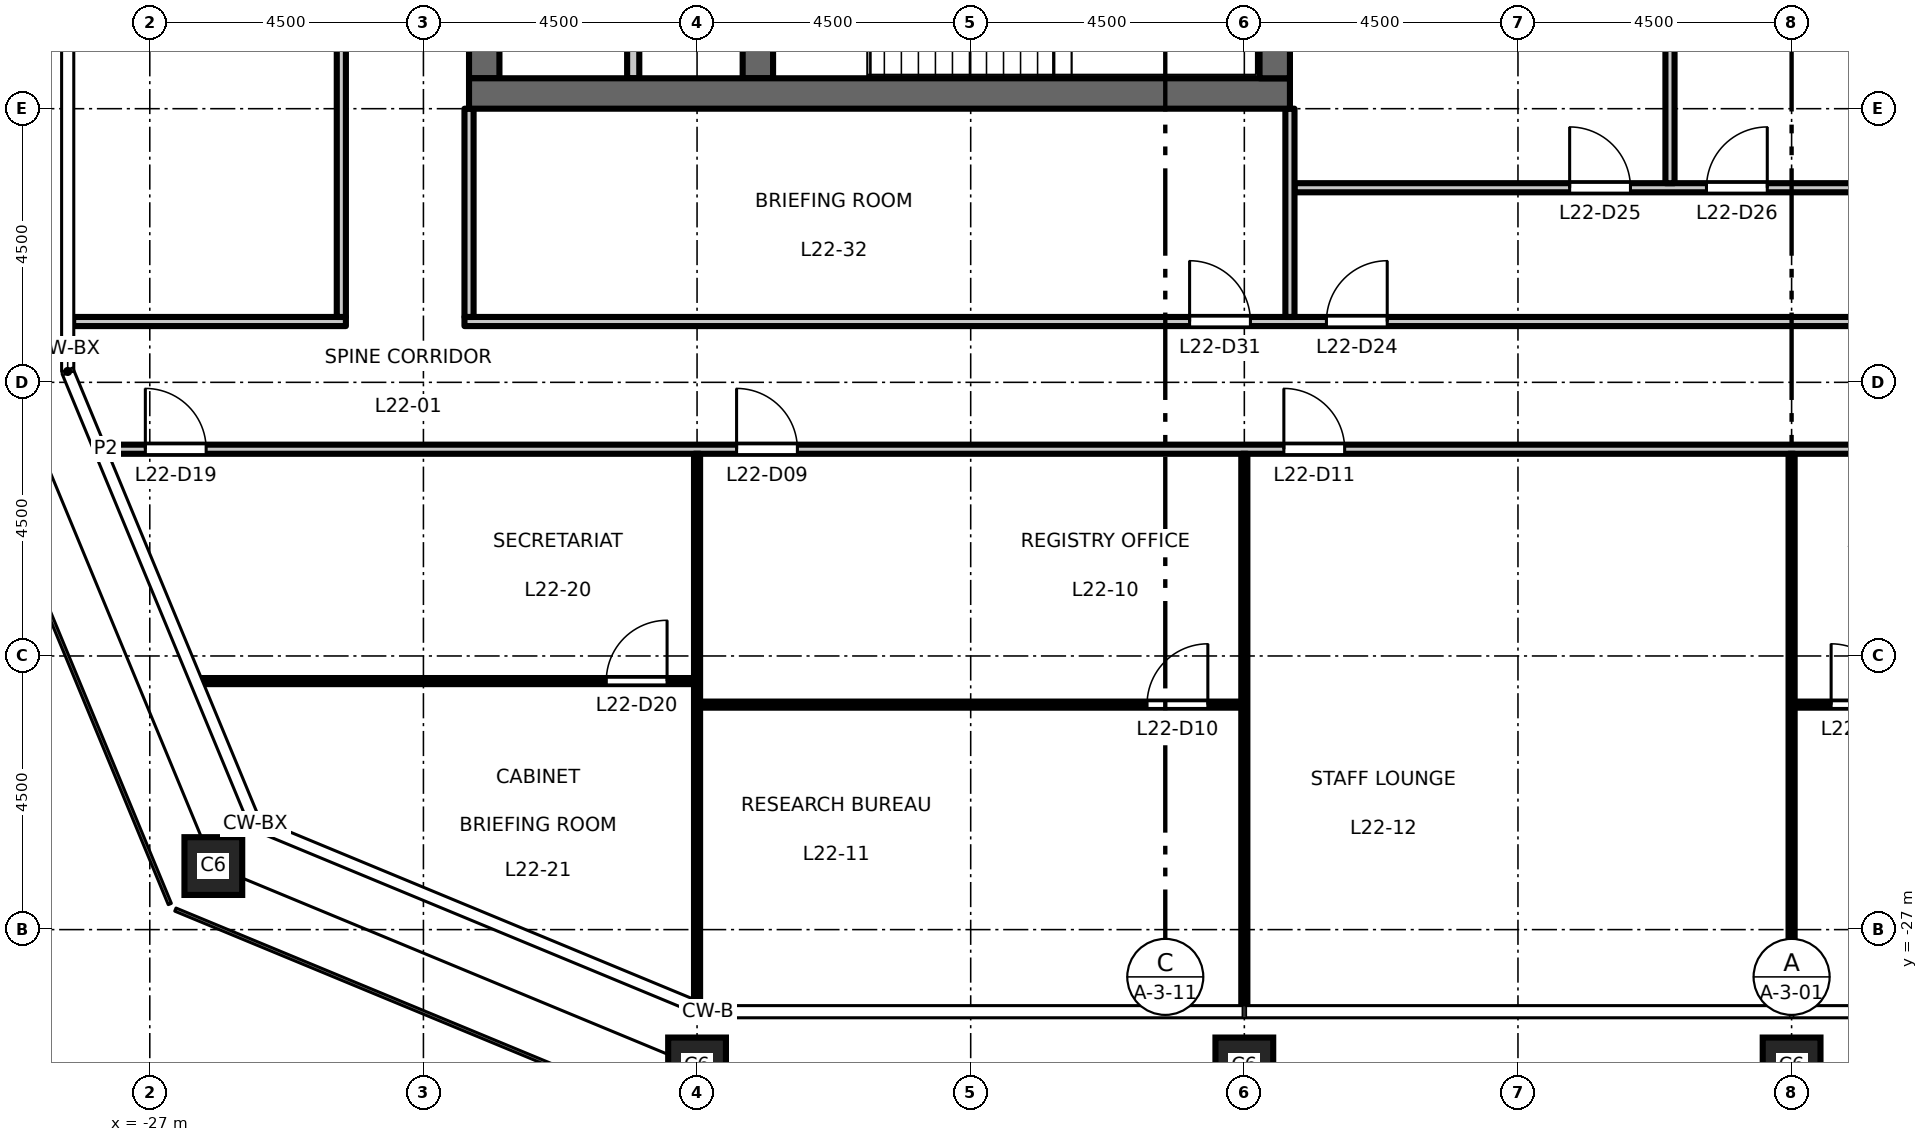
"""IFC4 building model, lengths in metres.
Left out: names, types, materials, properties, quantities, classifications, styles, units other than length and angle.
Written with IfcOpenShell. Run it as: python <this file> out.ifc"""

import sys

from ifc_helpers import new_model, si_unit, direction, frame, frame_2d, origin, origin_2d, place, context, subcontext, project, spatial, rectangle, hollow_rectangle, extrude, element, fill, save


model = new_model("IFC4")
c1 = context("Model", 3, precision=1e-05, world=origin(), true_north=direction((0.0, 1.0)))
c2 = subcontext(c1, "Body", "Model", "MODEL_VIEW")
j1 = project(units=[si_unit("LENGTHUNIT", "METRE"), si_unit("PLANEANGLEUNIT", "RADIAN")], contexts=[c1])
p1 = place(None, origin())
s1 = spatial("IfcSite", under=j1, at=p1, CompositionType="ELEMENT")
p2 = place(p1, origin())
s2 = spatial("IfcBuilding", under=s1, at=p2, CompositionType="ELEMENT")
p3 = place(p2, frame((0.0, 0.0, 104.7)))
s3 = spatial("IfcBuildingStorey", under=s2, at=p3, CompositionType="ELEMENT", Elevation=104.7)
for number, where, z_axis, x_axis in (
    (1, (-18.0, -29.25, 0.0), (0.0, 0.0, 1.0), (1.0, 0.0, 0.0)),
    (2, (-9.0, -29.25, 0.0), (0.0, 0.0, 1.0), (1.0, 0.0, 0.0)),
    (3, (0.0, -29.25, 0.0), (0.0, 0.0, 1.0), (1.0, 0.0, 0.0)),
    (4, (-25.955, -25.955, 0.0), (0.0, 0.0, 1.0), (1.0, 0.0, 0.0)),
):
    element("IfcColumn", number, at=place(p3, frame(where, z_axis=z_axis, x_axis=x_axis)), inside=s3, PredefinedType="COLUMN", context=c2, shape_type="SweptSolid", body=[
        extrude(hollow_rectangle(XDim=0.95, YDim=0.95, WallThickness=0.055, at=origin_2d()), origin(), (0.0, 0.0, 1.0), 4.5),
    ])
p4 = place(p3, frame((-21.5, -13.0, 0.0), z_axis=(0.0, 0.0, 1.0), x_axis=(0.0, 1.0, 0.0)))
e5 = element("IfcWall", 5, at=p4, inside=s3, PredefinedType="SHEAR", context=c2, shape_type="SweptSolid", body=[
    extrude(rectangle(XDim=26.0, YDim=0.5, at=frame_2d((13.0, 0.0))), origin(), (0.0, 0.0, 1.0), 4.35),
])
p5 = place(p4, frame((16.825, 0.0, 0.0)))
e6 = element("IfcOpeningElement", 6, at=p5, cuts=e5, PredefinedType="OPENING", context=c2, shape_type="SweptSolid", body=[
    extrude(rectangle(XDim=1.8, YDim=2.1, at=frame_2d((0.9, 1.05))), frame((0.0, 0.26, 0.0), z_axis=(0.0, -1.0, 0.0), x_axis=(1.0, 0.0, 0.0)), (0.0, 0.0, 1.0), 0.52),
])
p6 = place(p4, frame((7.375, 0.0, 0.0)))
e7 = element("IfcOpeningElement", 7, at=p6, cuts=e5, PredefinedType="OPENING", context=c2, shape_type="SweptSolid", body=[
    extrude(rectangle(XDim=1.8, YDim=2.1, at=frame_2d((0.9, 1.05))), frame((0.0, 0.26, 0.0), z_axis=(0.0, -1.0, 0.0), x_axis=(1.0, 0.0, 0.0)), (0.0, 0.0, 1.0), 0.52),
])
p7 = place(p4, frame((23.8, 0.0, 0.0)))
e8 = element("IfcOpeningElement", 8, at=p7, cuts=e5, PredefinedType="OPENING", context=c2, shape_type="SweptSolid", body=[
    extrude(rectangle(XDim=0.9, YDim=2.1, at=frame_2d((0.45, 1.05))), frame((0.0, 0.26, 0.0), z_axis=(0.0, -1.0, 0.0), x_axis=(1.0, 0.0, 0.0)), (0.0, 0.0, 1.0), 0.52),
])
p8 = place(p3, frame((-19.05, -13.0, 0.0), z_axis=(0.0, 0.0, 1.0), x_axis=(0.0, 1.0, 0.0)))
e9 = element("IfcWall", 9, at=p8, inside=s3, PredefinedType="PARTITIONING", context=c2, shape_type="SweptSolid", body=[
    extrude(rectangle(XDim=6.575, YDim=0.2, at=frame_2d((3.288, 0.0))), origin(), (0.0, 0.0, 1.0), 4.35),
])
p9 = place(p3, frame((-17.0, -13.0, 0.0), z_axis=(0.0, 0.0, 1.0), x_axis=(0.0, 1.0, 0.0)))
e10 = element("IfcWall", 10, at=p9, inside=s3, PredefinedType="SHEAR", context=c2, shape_type="SweptSolid", body=[
    extrude(rectangle(XDim=6.575, YDim=0.5, at=frame_2d((3.288, 0.0))), origin(), (0.0, 0.0, 1.0), 4.35),
])
p10 = place(p3, frame((-8.25, -13.25, 0.0), z_axis=(0.0, 0.0, 1.0), x_axis=(-1.0, 0.0, 0.0)))
e11 = element("IfcWall", 11, at=p10, inside=s3, PredefinedType="SHEAR", context=c2, shape_type="SweptSolid", body=[
    extrude(rectangle(XDim=13.5, YDim=0.5, at=frame_2d((6.75, 0.0))), origin(), (0.0, 0.0, 1.0), 4.35),
])
p11 = place(p3, frame((-8.5, -13.0, 0.0), z_axis=(0.0, 0.0, 1.0), x_axis=(0.0, 1.0, 0.0)))
e12 = element("IfcWall", 12, at=p11, inside=s3, PredefinedType="SHEAR", context=c2, shape_type="SweptSolid", body=[
    extrude(rectangle(XDim=26.0, YDim=0.5, at=frame_2d((13.0, 0.0))), origin(), (0.0, 0.0, 1.0), 4.35),
])
p12 = place(p3, frame((-17.95, -23.3, 0.0), z_axis=(0.0, 0.0, 1.0), x_axis=(1.0, 0.0, 0.0)))
e13 = element("IfcWall", 13, at=p12, inside=s3, PredefinedType="PARTITIONING", context=c2, shape_type="SweptSolid", body=[
    extrude(rectangle(XDim=8.9, YDim=0.1, at=frame_2d((4.45, 0.0))), origin(), (0.0, 0.0, 1.0), 4.35),
])
p13 = place(p12, frame((7.35, 0.0, 0.0)))
e14 = element("IfcOpeningElement", 14, at=p13, cuts=e13, PredefinedType="OPENING", context=c2, shape_type="SweptSolid", body=[
    extrude(rectangle(XDim=1.0, YDim=2.1, at=frame_2d((0.5, 1.05))), frame((0.0, 0.06, 0.0), z_axis=(0.0, -1.0, 0.0), x_axis=(1.0, 0.0, 0.0)), (0.0, 0.0, 1.0), 0.12),
])
p14 = place(p3, frame((0.05, -23.3, 0.0), z_axis=(0.0, 0.0, 1.0), x_axis=(1.0, 0.0, 0.0)))
e15 = element("IfcWall", 15, at=p14, inside=s3, PredefinedType="PARTITIONING", context=c2, shape_type="SweptSolid", body=[
    extrude(rectangle(XDim=8.9, YDim=0.1, at=frame_2d((4.45, 0.0))), origin(), (0.0, 0.0, 1.0), 4.35),
])
p15 = place(p14, frame((0.6, 0.0, 0.0)))
e16 = element("IfcOpeningElement", 16, at=p15, cuts=e15, PredefinedType="OPENING", context=c2, shape_type="SweptSolid", body=[
    extrude(rectangle(XDim=1.0, YDim=2.1, at=frame_2d((0.5, 1.05))), frame((0.0, 0.06, 0.0), z_axis=(0.0, -1.0, 0.0), x_axis=(1.0, 0.0, 0.0)), (0.0, 0.0, 1.0), 0.12),
])
p16 = place(p3, frame((-26.143, -22.913, 0.0), z_axis=(0.0, 0.0, 1.0), x_axis=(1.0, 0.0, 0.0)))
e17 = element("IfcWall", 17, at=p16, inside=s3, PredefinedType="PARTITIONING", context=c2, shape_type="SweptSolid", body=[
    extrude(rectangle(XDim=8.093, YDim=0.1, at=frame_2d((4.046, 0.0))), origin(), (0.0, 0.0, 1.0), 4.35),
])
p17 = place(p16, frame((6.65, 0.0, 0.0)))
e18 = element("IfcOpeningElement", 18, at=p17, cuts=e17, PredefinedType="OPENING", context=c2, shape_type="SweptSolid", body=[
    extrude(rectangle(XDim=1.0, YDim=2.1, at=frame_2d((0.5, 1.05))), frame((0.0, 0.06, 0.0), z_axis=(0.0, -1.0, 0.0), x_axis=(1.0, 0.0, 0.0)), (0.0, 0.0, 1.0), 0.12),
])
p18 = place(p3, frame((-27.723, -19.1, 0.0), z_axis=(0.0, 0.0, 1.0), x_axis=(1.0, 0.0, 0.0)))
e19 = element("IfcWall", 19, at=p18, inside=s3, PredefinedType="PARTITIONING", context=c2, shape_type="SweptSolid", body=[
    extrude(rectangle(XDim=55.446, YDim=0.15, at=frame_2d((27.723, 0.0))), origin(), (0.0, 0.0, 1.0), 4.35),
])
p19 = place(p18, frame((10.373, 0.0, 0.0)))
e20 = element("IfcOpeningElement", 20, at=p19, cuts=e19, PredefinedType="OPENING", context=c2, shape_type="SweptSolid", body=[
    extrude(rectangle(XDim=1.0, YDim=2.1, at=frame_2d((0.5, 1.05))), frame((0.0, 0.085, 0.0), z_axis=(0.0, -1.0, 0.0), x_axis=(1.0, 0.0, 0.0)), (0.0, 0.0, 1.0), 0.17),
])
p20 = place(p18, frame((19.373, 0.0, 0.0)))
e21 = element("IfcOpeningElement", 21, at=p20, cuts=e19, PredefinedType="OPENING", context=c2, shape_type="SweptSolid", body=[
    extrude(rectangle(XDim=1.0, YDim=2.1, at=frame_2d((0.5, 1.05))), frame((0.0, 0.085, 0.0), z_axis=(0.0, -1.0, 0.0), x_axis=(1.0, 0.0, 0.0)), (0.0, 0.0, 1.0), 0.17),
])
p21 = place(p18, frame((35.123, 0.0, 0.0)))
e22 = element("IfcOpeningElement", 22, at=p21, cuts=e19, PredefinedType="OPENING", context=c2, shape_type="SweptSolid", body=[
    extrude(rectangle(XDim=1.0, YDim=2.1, at=frame_2d((0.5, 1.05))), frame((0.0, 0.085, 0.0), z_axis=(0.0, -1.0, 0.0), x_axis=(1.0, 0.0, 0.0)), (0.0, 0.0, 1.0), 0.17),
])
p22 = place(p18, frame((44.123, 0.0, 0.0)))
e23 = element("IfcOpeningElement", 23, at=p22, cuts=e19, PredefinedType="OPENING", context=c2, shape_type="SweptSolid", body=[
    extrude(rectangle(XDim=1.0, YDim=2.1, at=frame_2d((0.5, 1.05))), frame((0.0, 0.085, 0.0), z_axis=(0.0, -1.0, 0.0), x_axis=(1.0, 0.0, 0.0)), (0.0, 0.0, 1.0), 0.17),
])
p23 = place(p18, frame((0.65, 0.0, 0.0)))
e24 = element("IfcOpeningElement", 24, at=p23, cuts=e19, PredefinedType="OPENING", context=c2, shape_type="SweptSolid", body=[
    extrude(rectangle(XDim=1.0, YDim=2.1, at=frame_2d((0.5, 1.05))), frame((0.0, 0.085, 0.0), z_axis=(0.0, -1.0, 0.0), x_axis=(1.0, 0.0, 0.0)), (0.0, 0.0, 1.0), 0.17),
])
p24 = place(p18, frame((46.373, 0.0, 0.0)))
e25 = element("IfcOpeningElement", 25, at=p24, cuts=e19, PredefinedType="OPENING", context=c2, shape_type="SweptSolid", body=[
    extrude(rectangle(XDim=1.0, YDim=2.1, at=frame_2d((0.5, 1.05))), frame((0.0, 0.085, 0.0), z_axis=(0.0, -1.0, 0.0), x_axis=(1.0, 0.0, 0.0)), (0.0, 0.0, 1.0), 0.17),
])
p25 = place(p3, frame((-28.26, -17.0, 0.0), z_axis=(0.0, 0.0, 1.0), x_axis=(1.0, 0.0, 0.0)))
e26 = element("IfcWall", 26, at=p25, inside=s3, PredefinedType="PARTITIONING", context=c2, shape_type="SweptSolid", body=[
    extrude(rectangle(XDim=4.485, YDim=0.15, at=frame_2d((2.243, 0.0))), origin(), (0.0, 0.0, 1.0), 4.35),
])
p26 = place(p3, frame((-21.825, -17.0, 0.0), z_axis=(0.0, 0.0, 1.0), x_axis=(1.0, 0.0, 0.0)))
e27 = element("IfcWall", 27, at=p26, inside=s3, PredefinedType="PARTITIONING", context=c2, shape_type="SweptSolid", body=[
    extrude(rectangle(XDim=43.65, YDim=0.15, at=frame_2d((21.825, 0.0))), origin(), (0.0, 0.0, 1.0), 4.35),
])
p27 = place(p26, frame((14.175, 0.0, 0.0)))
e28 = element("IfcOpeningElement", 28, at=p27, cuts=e27, PredefinedType="OPENING", context=c2, shape_type="SweptSolid", body=[
    extrude(rectangle(XDim=1.0, YDim=2.1, at=frame_2d((0.5, 1.05))), frame((0.0, 0.085, 0.0), z_axis=(0.0, -1.0, 0.0), x_axis=(1.0, 0.0, 0.0)), (0.0, 0.0, 1.0), 0.17),
])
p28 = place(p26, frame((11.925, 0.0, 0.0)))
e29 = element("IfcOpeningElement", 29, at=p28, cuts=e27, PredefinedType="OPENING", context=c2, shape_type="SweptSolid", body=[
    extrude(rectangle(XDim=1.0, YDim=2.1, at=frame_2d((0.5, 1.05))), frame((0.0, 0.085, 0.0), z_axis=(0.0, -1.0, 0.0), x_axis=(1.0, 0.0, 0.0)), (0.0, 0.0, 1.0), 0.17),
])
p29 = place(p26, frame((30.675, 0.0, 0.0)))
e30 = element("IfcOpeningElement", 30, at=p29, cuts=e27, PredefinedType="OPENING", context=c2, shape_type="SweptSolid", body=[
    extrude(rectangle(XDim=1.0, YDim=2.1, at=frame_2d((0.5, 1.05))), frame((0.0, 0.085, 0.0), z_axis=(0.0, -1.0, 0.0), x_axis=(1.0, 0.0, 0.0)), (0.0, 0.0, 1.0), 0.17),
])
p30 = place(p3, frame((-8.175, -14.8, 0.0), z_axis=(0.0, 0.0, 1.0), x_axis=(1.0, 0.0, 0.0)))
e31 = element("IfcWall", 31, at=p30, inside=s3, PredefinedType="PARTITIONING", context=c2, shape_type="SweptSolid", body=[
    extrude(rectangle(XDim=15.095, YDim=0.15, at=frame_2d((7.547, 0.0))), origin(), (0.0, 0.0, 1.0), 4.35),
])
p31 = place(p30, frame((4.525, 0.0, 0.0)))
e32 = element("IfcOpeningElement", 32, at=p31, cuts=e31, PredefinedType="OPENING", context=c2, shape_type="SweptSolid", body=[
    extrude(rectangle(XDim=1.0, YDim=2.1, at=frame_2d((0.5, 1.05))), frame((0.0, 0.085, 0.0), z_axis=(0.0, -1.0, 0.0), x_axis=(1.0, 0.0, 0.0)), (0.0, 0.0, 1.0), 0.17),
])
p32 = place(p30, frame((6.775, 0.0, 0.0)))
e33 = element("IfcOpeningElement", 33, at=p32, cuts=e31, PredefinedType="OPENING", context=c2, shape_type="SweptSolid", body=[
    extrude(rectangle(XDim=1.0, YDim=2.1, at=frame_2d((0.5, 1.05))), frame((0.0, 0.085, 0.0), z_axis=(0.0, -1.0, 0.0), x_axis=(1.0, 0.0, 0.0)), (0.0, 0.0, 1.0), 0.17),
])
p33 = place(p30, frame((13.445, 0.0, 0.0)))
e34 = element("IfcOpeningElement", 34, at=p33, cuts=e31, PredefinedType="OPENING", context=c2, shape_type="SweptSolid", body=[
    extrude(rectangle(XDim=1.0, YDim=2.1, at=frame_2d((0.5, 1.05))), frame((0.0, 0.085, 0.0), z_axis=(0.0, -1.0, 0.0), x_axis=(1.0, 0.0, 0.0)), (0.0, 0.0, 1.0), 0.17),
])
p34 = place(p3, frame((-23.85, -16.925, 0.0), z_axis=(0.0, 0.0, 1.0), x_axis=(0.0, 1.0, 0.0)))
e35 = element("IfcWall", 35, at=p34, inside=s3, PredefinedType="PARTITIONING", context=c2, shape_type="SweptSolid", body=[
    extrude(rectangle(XDim=33.85, YDim=0.15, at=frame_2d((16.925, 0.0))), origin(), (0.0, 0.0, 1.0), 4.35),
])
p35 = place(p34, frame((32.275, 0.0, 0.0)))
e36 = element("IfcOpeningElement", 36, at=p35, cuts=e35, PredefinedType="OPENING", context=c2, shape_type="SweptSolid", body=[
    extrude(rectangle(XDim=1.0, YDim=2.1, at=frame_2d((0.5, 1.05))), frame((0.0, 0.085, 0.0), z_axis=(0.0, -1.0, 0.0), x_axis=(1.0, 0.0, 0.0)), (0.0, 0.0, 1.0), 0.17),
])
p36 = place(p3, frame((-21.75, -16.925, 0.0), z_axis=(0.0, 0.0, 1.0), x_axis=(0.0, 1.0, 0.0)))
e37 = element("IfcWall", 37, at=p36, inside=s3, PredefinedType="PARTITIONING", context=c2, shape_type="SweptSolid", body=[
    extrude(rectangle(XDim=3.425, YDim=0.15, at=frame_2d((1.712, 0.0))), origin(), (0.0, 0.0, 1.0), 4.35),
])
p37 = place(p3, frame((-18.0, -28.178, 0.0), z_axis=(0.0, 0.0, 1.0), x_axis=(0.0, 1.0, 0.0)))
e38 = element("IfcWall", 38, at=p37, inside=s3, PredefinedType="PARTITIONING", context=c2, shape_type="SweptSolid", body=[
    extrude(rectangle(XDim=9.003, YDim=0.1, at=frame_2d((4.501, 0.0))), origin(), (0.0, 0.0, 1.0), 3.45),
])
p38 = place(p3, frame((-9.0, -28.26, 0.0), z_axis=(0.0, 0.0, 1.0), x_axis=(0.0, 1.0, 0.0)))
e39 = element("IfcWall", 39, at=p38, inside=s3, PredefinedType="PARTITIONING", context=c2, shape_type="SweptSolid", body=[
    extrude(rectangle(XDim=9.085, YDim=0.1, at=frame_2d((4.542, 0.0))), origin(), (0.0, 0.0, 1.0), 3.45),
])
p39 = place(p3, frame((-8.25, -16.925, 0.0), z_axis=(0.0, 0.0, 1.0), x_axis=(0.0, 1.0, 0.0)))
e40 = element("IfcWall", 40, at=p39, inside=s3, PredefinedType="PARTITIONING", context=c2, shape_type="SweptSolid", body=[
    extrude(rectangle(XDim=3.425, YDim=0.15, at=frame_2d((1.712, 0.0))), origin(), (0.0, 0.0, 1.0), 4.35),
])
p40 = place(p3, frame((-2.0, -14.725, 0.0), z_axis=(0.0, 0.0, 1.0), x_axis=(0.0, 1.0, 0.0)))
e41 = element("IfcWall", 41, at=p40, inside=s3, PredefinedType="PARTITIONING", context=c2, shape_type="SweptSolid", body=[
    extrude(rectangle(XDim=6.355, YDim=0.15, at=frame_2d((3.177, 0.0))), origin(), (0.0, 0.0, 1.0), 4.35),
])
p41 = place(p3, frame((0.0, -28.26, 0.0), z_axis=(0.0, 0.0, 1.0), x_axis=(0.0, 1.0, 0.0)))
e42 = element("IfcWall", 42, at=p41, inside=s3, PredefinedType="PARTITIONING", context=c2, shape_type="SweptSolid", body=[
    extrude(rectangle(XDim=9.085, YDim=0.1, at=frame_2d((4.542, 0.0))), origin(), (0.0, 0.0, 1.0), 3.45),
])
p42 = place(p19, origin())
e43 = element("IfcDoor", 43, at=p42, inside=s3, OperationType="SINGLE_SWING_LEFT", PredefinedType="DOOR", context=c2, shape_type="SweptSolid", body=[
    extrude(rectangle(XDim=1.0, YDim=2.1, at=frame_2d((0.5, 1.05))), frame((0.0, 0.025, 0.0), z_axis=(0.0, -1.0, 0.0), x_axis=(1.0, 0.0, 0.0)), (0.0, 0.0, 1.0), 0.05),
])
fill(e20, e43)
p43 = place(p13, origin())
e44 = element("IfcDoor", 44, at=p43, inside=s3, OperationType="SINGLE_SWING_RIGHT", PredefinedType="DOOR", context=c2, shape_type="SweptSolid", body=[
    extrude(rectangle(XDim=1.0, YDim=2.1, at=frame_2d((0.5, 1.05))), frame((0.0, 0.025, 0.0), z_axis=(0.0, -1.0, 0.0), x_axis=(1.0, 0.0, 0.0)), (0.0, 0.0, 1.0), 0.05),
])
fill(e14, e44)
p44 = place(p20, origin())
e45 = element("IfcDoor", 45, at=p44, inside=s3, OperationType="SINGLE_SWING_LEFT", PredefinedType="DOOR", context=c2, shape_type="SweptSolid", body=[
    extrude(rectangle(XDim=1.0, YDim=2.1, at=frame_2d((0.5, 1.05))), frame((0.0, 0.025, 0.0), z_axis=(0.0, -1.0, 0.0), x_axis=(1.0, 0.0, 0.0)), (0.0, 0.0, 1.0), 0.05),
])
fill(e21, e45)
p45 = place(p15, origin())
e46 = element("IfcDoor", 46, at=p45, inside=s3, OperationType="SINGLE_SWING_LEFT", PredefinedType="DOOR", context=c2, shape_type="SweptSolid", body=[
    extrude(rectangle(XDim=1.0, YDim=2.1, at=frame_2d((0.5, 1.05))), frame((0.0, 0.025, 0.0), z_axis=(0.0, -1.0, 0.0), x_axis=(1.0, 0.0, 0.0)), (0.0, 0.0, 1.0), 0.05),
])
fill(e16, e46)
p46 = place(p23, origin())
e47 = element("IfcDoor", 47, at=p46, inside=s3, OperationType="SINGLE_SWING_LEFT", PredefinedType="DOOR", context=c2, shape_type="SweptSolid", body=[
    extrude(rectangle(XDim=1.0, YDim=2.1, at=frame_2d((0.5, 1.05))), frame((0.0, 0.025, 0.0), z_axis=(0.0, -1.0, 0.0), x_axis=(1.0, 0.0, 0.0)), (0.0, 0.0, 1.0), 0.05),
])
fill(e24, e47)
p47 = place(p17, origin())
e48 = element("IfcDoor", 48, at=p47, inside=s3, OperationType="SINGLE_SWING_RIGHT", PredefinedType="DOOR", context=c2, shape_type="SweptSolid", body=[
    extrude(rectangle(XDim=1.0, YDim=2.1, at=frame_2d((0.5, 1.05))), frame((0.0, 0.025, 0.0), z_axis=(0.0, -1.0, 0.0), x_axis=(1.0, 0.0, 0.0)), (0.0, 0.0, 1.0), 0.05),
])
fill(e18, e48)
p48 = place(p27, origin())
e49 = element("IfcDoor", 49, at=p48, inside=s3, OperationType="SINGLE_SWING_RIGHT", PredefinedType="DOOR", context=c2, shape_type="SweptSolid", body=[
    extrude(rectangle(XDim=1.0, YDim=2.1, at=frame_2d((0.5, 1.05))), frame((0.0, 0.025, 0.0), z_axis=(0.0, -1.0, 0.0), x_axis=(1.0, 0.0, 0.0)), (0.0, 0.0, 1.0), 0.05),
])
fill(e28, e49)
p49 = place(p31, origin())
e50 = element("IfcDoor", 50, at=p49, inside=s3, OperationType="SINGLE_SWING_LEFT", PredefinedType="DOOR", context=c2, shape_type="SweptSolid", body=[
    extrude(rectangle(XDim=1.0, YDim=2.1, at=frame_2d((0.5, 1.05))), frame((0.0, 0.025, 0.0), z_axis=(0.0, -1.0, 0.0), x_axis=(1.0, 0.0, 0.0)), (0.0, 0.0, 1.0), 0.05),
])
fill(e32, e50)
p50 = place(p32, origin())
e51 = element("IfcDoor", 51, at=p50, inside=s3, OperationType="SINGLE_SWING_RIGHT", PredefinedType="DOOR", context=c2, shape_type="SweptSolid", body=[
    extrude(rectangle(XDim=1.0, YDim=2.1, at=frame_2d((0.5, 1.05))), frame((0.0, 0.025, 0.0), z_axis=(0.0, -1.0, 0.0), x_axis=(1.0, 0.0, 0.0)), (0.0, 0.0, 1.0), 0.05),
])
fill(e33, e51)
p51 = place(p28, origin())
e52 = element("IfcDoor", 52, at=p51, inside=s3, OperationType="SINGLE_SWING_LEFT", PredefinedType="DOOR", context=c2, shape_type="SweptSolid", body=[
    extrude(rectangle(XDim=1.0, YDim=2.1, at=frame_2d((0.5, 1.05))), frame((0.0, 0.025, 0.0), z_axis=(0.0, -1.0, 0.0), x_axis=(1.0, 0.0, 0.0)), (0.0, 0.0, 1.0), 0.05),
])
fill(e29, e52)
save(model, sys.argv[1])
